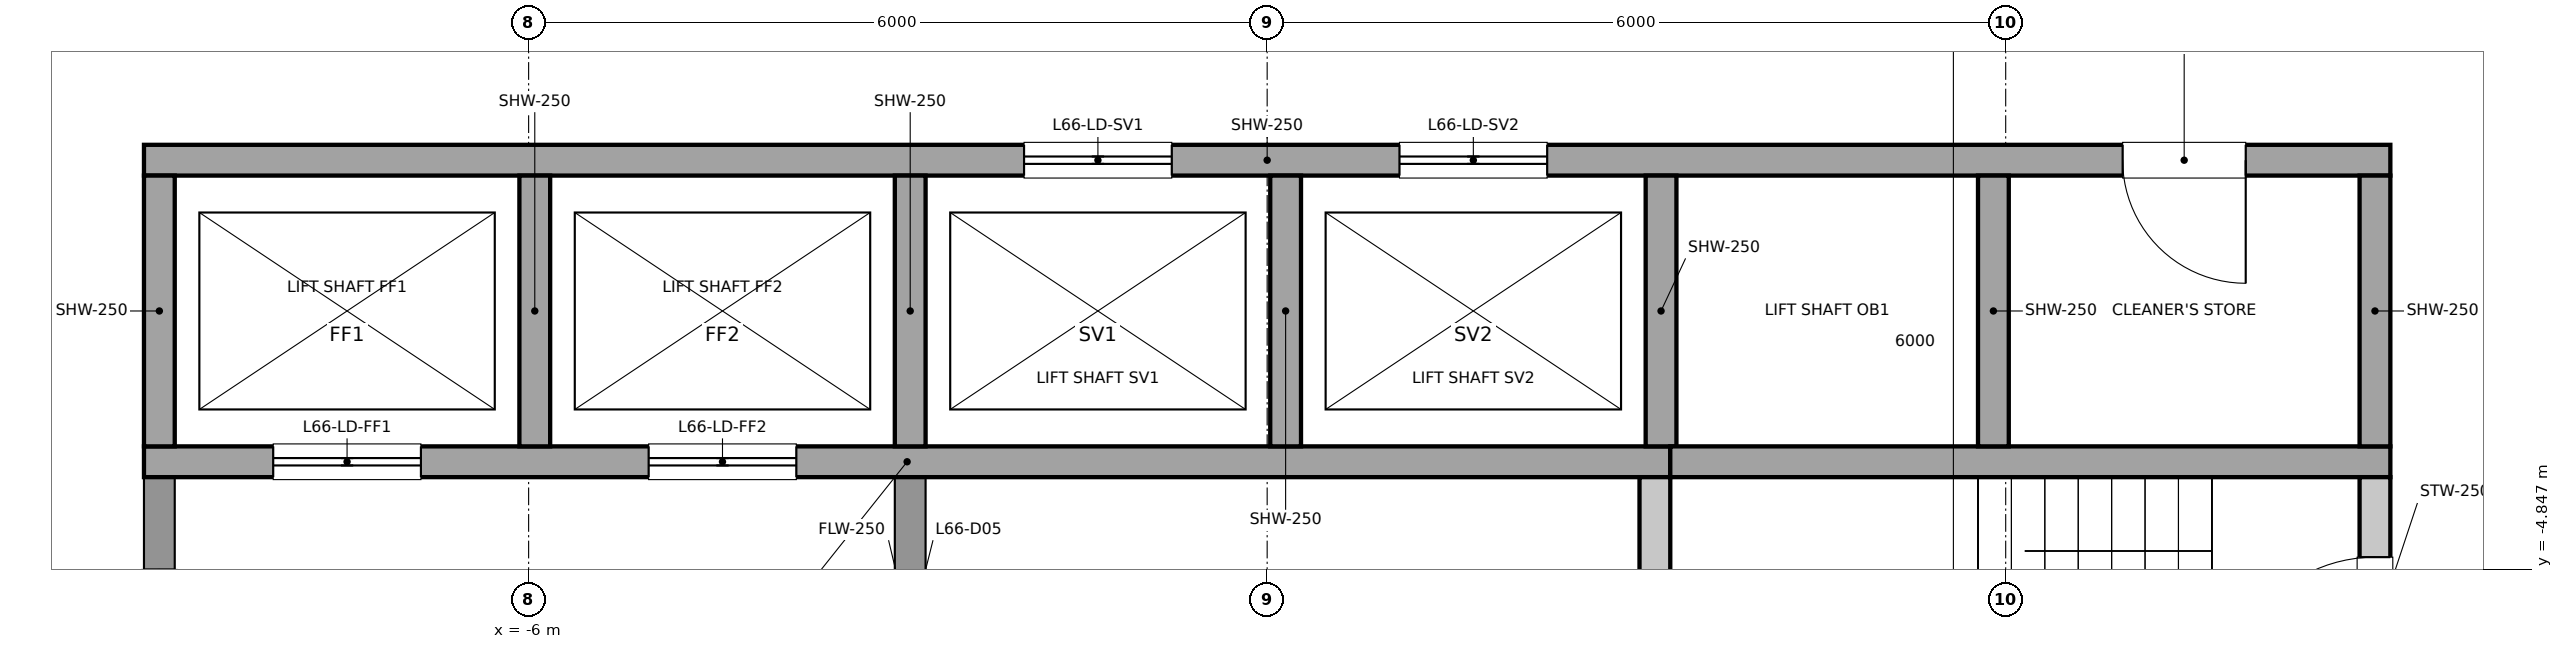
"""IFC4 building model, lengths in metres.
Left out: names, types, materials, properties, quantities, classifications, styles, units other than length and angle.
Written with IfcOpenShell. Run it as: python <this file> out.ifc"""

import sys

from ifc_helpers import new_model, si_unit, direction, frame, frame_2d, origin, place, context, subcontext, project, spatial, rectangle, extrude, element, fill, save


model = new_model("IFC4")
c1 = context("Model", 3, precision=1e-05, world=origin(), true_north=direction((0.0, 1.0)))
c2 = subcontext(c1, "Body", "Model", "MODEL_VIEW")
j1 = project(units=[si_unit("LENGTHUNIT", "METRE"), si_unit("PLANEANGLEUNIT", "RADIAN")], contexts=[c1])
p1 = place(None, origin())
s1 = spatial("IfcSite", under=j1, at=p1, CompositionType="ELEMENT")
p2 = place(p1, origin())
s2 = spatial("IfcBuilding", under=s1, at=p2, CompositionType="ELEMENT")
p3 = place(p2, frame((0.0, 0.0, 299.0)))
s3 = spatial("IfcBuildingStorey", under=s2, at=p3, CompositionType="ELEMENT", Elevation=299.0)
p4 = place(p3, frame((9.0, -6.6, 0.0), z_axis=(0.0, 0.0, 1.0), x_axis=(0.0, 1.0, 0.0)))
e1 = element("IfcWall", 1, at=p4, inside=s3, PredefinedType="SOLIDWALL", context=c2, shape_type="SweptSolid", body=[
    extrude(rectangle(XDim=2.5, YDim=0.25, at=frame_2d((1.25, 0.0))), origin(), (0.0, 0.0, 1.0), 5.25),
])
p5 = place(p4, frame((0.65, 0.0, 0.0)))
e2 = element("IfcOpeningElement", 2, at=p5, cuts=e1, PredefinedType="OPENING", context=c2, shape_type="SweptSolid", body=[
    extrude(rectangle(XDim=1.2, YDim=2.1, at=frame_2d((0.6, 1.05))), frame((0.0, 0.125, 0.0), z_axis=(0.0, -1.0, 0.0), x_axis=(1.0, 0.0, 0.0)), (0.0, 0.0, 1.0), 0.25),
])
p6 = place(p3, frame((-9.0, -6.6, 0.0), z_axis=(0.0, 0.0, 1.0), x_axis=(0.0, 1.0, 0.0)))
e3 = element("IfcWall", 3, at=p6, inside=s3, PredefinedType="PARTITIONING", context=c2, shape_type="SweptSolid", body=[
    extrude(rectangle(XDim=2.5, YDim=0.25, at=frame_2d((1.25, 0.0))), origin(), (0.0, 0.0, 1.0), 5.25),
])
p7 = place(p6, frame((0.75, 0.0, 0.0)))
e4 = element("IfcOpeningElement", 4, at=p7, cuts=e3, PredefinedType="OPENING", context=c2, shape_type="SweptSolid", body=[
    extrude(rectangle(XDim=1.0, YDim=2.1, at=frame_2d((0.5, 1.05))), frame((0.0, 0.125, 0.0), z_axis=(0.0, -1.0, 0.0), x_axis=(1.0, 0.0, 0.0)), (0.0, 0.0, 1.0), 0.25),
])
p8 = place(p3, frame((3.15, -6.6, 0.0), z_axis=(0.0, 0.0, 1.0), x_axis=(0.0, 1.0, 0.0)))
e5 = element("IfcWall", 5, at=p8, inside=s3, PredefinedType="SOLIDWALL", context=c2, shape_type="SweptSolid", body=[
    extrude(rectangle(XDim=2.5, YDim=0.25, at=frame_2d((1.25, 0.0))), origin(), (0.0, 0.0, 1.0), 5.25),
])
p9 = place(p3, frame((-2.9, -6.6, 0.0), z_axis=(0.0, 0.0, 1.0), x_axis=(0.0, 1.0, 0.0)))
e6 = element("IfcWall", 6, at=p9, inside=s3, PredefinedType="PARTITIONING", context=c2, shape_type="SweptSolid", body=[
    extrude(rectangle(XDim=2.5, YDim=0.25, at=frame_2d((1.25, 0.0))), origin(), (0.0, 0.0, 1.0), 5.25),
])
p10 = place(p9, frame((0.8, 0.0, 0.0)))
e7 = element("IfcOpeningElement", 7, at=p10, cuts=e6, PredefinedType="OPENING", context=c2, shape_type="SweptSolid", body=[
    extrude(rectangle(XDim=0.9, YDim=2.1, at=frame_2d((0.45, 1.05))), frame((0.0, 0.125, 0.0), z_axis=(0.0, -1.0, 0.0), x_axis=(1.0, 0.0, 0.0)), (0.0, 0.0, 1.0), 0.25),
])
p11 = place(p3, frame((-9.125, -1.525, 0.0), z_axis=(0.0, 0.0, 1.0), x_axis=(1.0, 0.0, 0.0)))
e8 = element("IfcWall", 8, at=p11, inside=s3, PredefinedType="SOLIDWALL", context=c2, shape_type="SweptSolid", body=[
    extrude(rectangle(XDim=18.25, YDim=0.25, at=frame_2d((9.125, 0.0))), origin(), (0.0, 0.0, 1.0), 5.25),
])
p12 = place(p11, frame((7.15, 0.0, 0.0)))
e9 = element("IfcOpeningElement", 9, at=p12, cuts=e8, PredefinedType="OPENING", context=c2, shape_type="SweptSolid", body=[
    extrude(rectangle(XDim=1.2, YDim=2.1, at=frame_2d((0.6, 1.05))), frame((0.0, 0.125, 0.0), z_axis=(0.0, -1.0, 0.0), x_axis=(1.0, 0.0, 0.0)), (0.0, 0.0, 1.0), 0.25),
])
p13 = place(p11, frame((10.2, 0.0, 0.0)))
e10 = element("IfcOpeningElement", 10, at=p13, cuts=e8, PredefinedType="OPENING", context=c2, shape_type="SweptSolid", body=[
    extrude(rectangle(XDim=1.2, YDim=2.1, at=frame_2d((0.6, 1.05))), frame((0.0, 0.125, 0.0), z_axis=(0.0, -1.0, 0.0), x_axis=(1.0, 0.0, 0.0)), (0.0, 0.0, 1.0), 0.25),
])
p14 = place(p11, frame((16.075, 0.0, 0.0)))
e11 = element("IfcOpeningElement", 11, at=p14, cuts=e8, PredefinedType="OPENING", context=c2, shape_type="SweptSolid", body=[
    extrude(rectangle(XDim=1.0, YDim=2.1, at=frame_2d((0.5, 1.05))), frame((0.0, 0.125, 0.0), z_axis=(0.0, -1.0, 0.0), x_axis=(1.0, 0.0, 0.0)), (0.0, 0.0, 1.0), 0.25),
])
p15 = place(p3, frame((-9.125, -3.975, 0.0), z_axis=(0.0, 0.0, 1.0), x_axis=(1.0, 0.0, 0.0)))
e12 = element("IfcWall", 12, at=p15, inside=s3, PredefinedType="SOLIDWALL", context=c2, shape_type="SweptSolid", body=[
    extrude(rectangle(XDim=12.4, YDim=0.25, at=frame_2d((6.2, 0.0))), origin(), (0.0, 0.0, 1.0), 5.25),
])
p16 = place(p15, frame((1.05, 0.0, 0.0)))
e13 = element("IfcOpeningElement", 13, at=p16, cuts=e12, PredefinedType="OPENING", context=c2, shape_type="SweptSolid", body=[
    extrude(rectangle(XDim=1.2, YDim=2.1, at=frame_2d((0.6, 1.05))), frame((0.0, 0.125, 0.0), z_axis=(0.0, -1.0, 0.0), x_axis=(1.0, 0.0, 0.0)), (0.0, 0.0, 1.0), 0.25),
])
p17 = place(p15, frame((4.1, 0.0, 0.0)))
e14 = element("IfcOpeningElement", 14, at=p17, cuts=e12, PredefinedType="OPENING", context=c2, shape_type="SweptSolid", body=[
    extrude(rectangle(XDim=1.2, YDim=2.1, at=frame_2d((0.6, 1.05))), frame((0.0, 0.125, 0.0), z_axis=(0.0, -1.0, 0.0), x_axis=(1.0, 0.0, 0.0)), (0.0, 0.0, 1.0), 0.25),
])
p18 = place(p3, frame((3.275, -3.975, 0.0), z_axis=(0.0, 0.0, 1.0), x_axis=(1.0, 0.0, 0.0)))
e15 = element("IfcWall", 15, at=p18, inside=s3, PredefinedType="SOLIDWALL", context=c2, shape_type="SweptSolid", body=[
    extrude(rectangle(XDim=5.85, YDim=0.25, at=frame_2d((2.925, 0.0))), origin(), (0.0, 0.0, 1.0), 5.25),
])
for number, where, z_axis, x_axis in (
    (16, (-9.0, -3.85, 0.0), (0.0, 0.0, 1.0), (0.0, 1.0, 0.0)),
    (17, (-5.95, -3.85, 0.0), (0.0, 0.0, 1.0), (0.0, 1.0, 0.0)),
    (18, (-2.9, -3.85, 0.0), (0.0, 0.0, 1.0), (0.0, 1.0, 0.0)),
    (19, (0.15, -3.85, 0.0), (0.0, 0.0, 1.0), (0.0, 1.0, 0.0)),
    (20, (3.2, -3.85, 0.0), (0.0, 0.0, 1.0), (0.0, 1.0, 0.0)),
    (21, (5.9, -3.85, 0.0), (0.0, 0.0, 1.0), (0.0, 1.0, 0.0)),
    (22, (9.0, -3.85, 0.0), (0.0, 0.0, 1.0), (0.0, 1.0, 0.0)),
):
    element("IfcWall", number, at=place(p3, frame(where, z_axis=z_axis, x_axis=x_axis)), inside=s3, PredefinedType="SOLIDWALL", context=c2, shape_type="SweptSolid", body=[
        extrude(rectangle(XDim=2.2, YDim=0.25, at=frame_2d((1.1, 0.0))), origin(), (0.0, 0.0, 1.0), 5.25),
    ])
p19 = place(p16, origin())
e23 = element("IfcDoor", 23, at=p19, inside=s3, OperationType="DOUBLE_DOOR_SLIDING", PredefinedType="DOOR", context=c2, shape_type="SweptSolid", body=[
    extrude(rectangle(XDim=1.2, YDim=2.1, at=frame_2d((0.6, 1.05))), frame((0.0, 0.025, 0.0), z_axis=(0.0, -1.0, 0.0), x_axis=(1.0, 0.0, 0.0)), (0.0, 0.0, 1.0), 0.05),
])
fill(e13, e23)
p20 = place(p17, origin())
e24 = element("IfcDoor", 24, at=p20, inside=s3, OperationType="DOUBLE_DOOR_SLIDING", PredefinedType="DOOR", context=c2, shape_type="SweptSolid", body=[
    extrude(rectangle(XDim=1.2, YDim=2.1, at=frame_2d((0.6, 1.05))), frame((0.0, 0.025, 0.0), z_axis=(0.0, -1.0, 0.0), x_axis=(1.0, 0.0, 0.0)), (0.0, 0.0, 1.0), 0.05),
])
fill(e14, e24)
p21 = place(p12, origin())
e25 = element("IfcDoor", 25, at=p21, inside=s3, OperationType="DOUBLE_DOOR_SLIDING", PredefinedType="DOOR", context=c2, shape_type="SweptSolid", body=[
    extrude(rectangle(XDim=1.2, YDim=2.1, at=frame_2d((0.6, 1.05))), frame((0.0, 0.025, 0.0), z_axis=(0.0, -1.0, 0.0), x_axis=(1.0, 0.0, 0.0)), (0.0, 0.0, 1.0), 0.05),
])
fill(e9, e25)
p22 = place(p13, origin())
e26 = element("IfcDoor", 26, at=p22, inside=s3, OperationType="DOUBLE_DOOR_SLIDING", PredefinedType="DOOR", context=c2, shape_type="SweptSolid", body=[
    extrude(rectangle(XDim=1.2, YDim=2.1, at=frame_2d((0.6, 1.05))), frame((0.0, 0.025, 0.0), z_axis=(0.0, -1.0, 0.0), x_axis=(1.0, 0.0, 0.0)), (0.0, 0.0, 1.0), 0.05),
])
fill(e10, e26)
p23 = place(p5, origin())
e27 = element("IfcDoor", 27, at=p23, inside=s3, OperationType="SINGLE_SWING_LEFT", PredefinedType="DOOR", context=c2, shape_type="SweptSolid", body=[
    extrude(rectangle(XDim=1.2, YDim=2.1, at=frame_2d((0.6, 1.05))), frame((0.0, 0.025, 0.0), z_axis=(0.0, -1.0, 0.0), x_axis=(1.0, 0.0, 0.0)), (0.0, 0.0, 1.0), 0.05),
])
fill(e2, e27)
p24 = place(p14, origin())
e28 = element("IfcDoor", 28, at=p24, inside=s3, OperationType="SINGLE_SWING_RIGHT", PredefinedType="DOOR", context=c2, shape_type="SweptSolid", body=[
    extrude(rectangle(XDim=1.0, YDim=2.1, at=frame_2d((0.5, 1.05))), frame((0.0, 0.025, 0.0), z_axis=(0.0, -1.0, 0.0), x_axis=(1.0, 0.0, 0.0)), (0.0, 0.0, 1.0), 0.05),
])
fill(e11, e28)
save(model, sys.argv[1])
